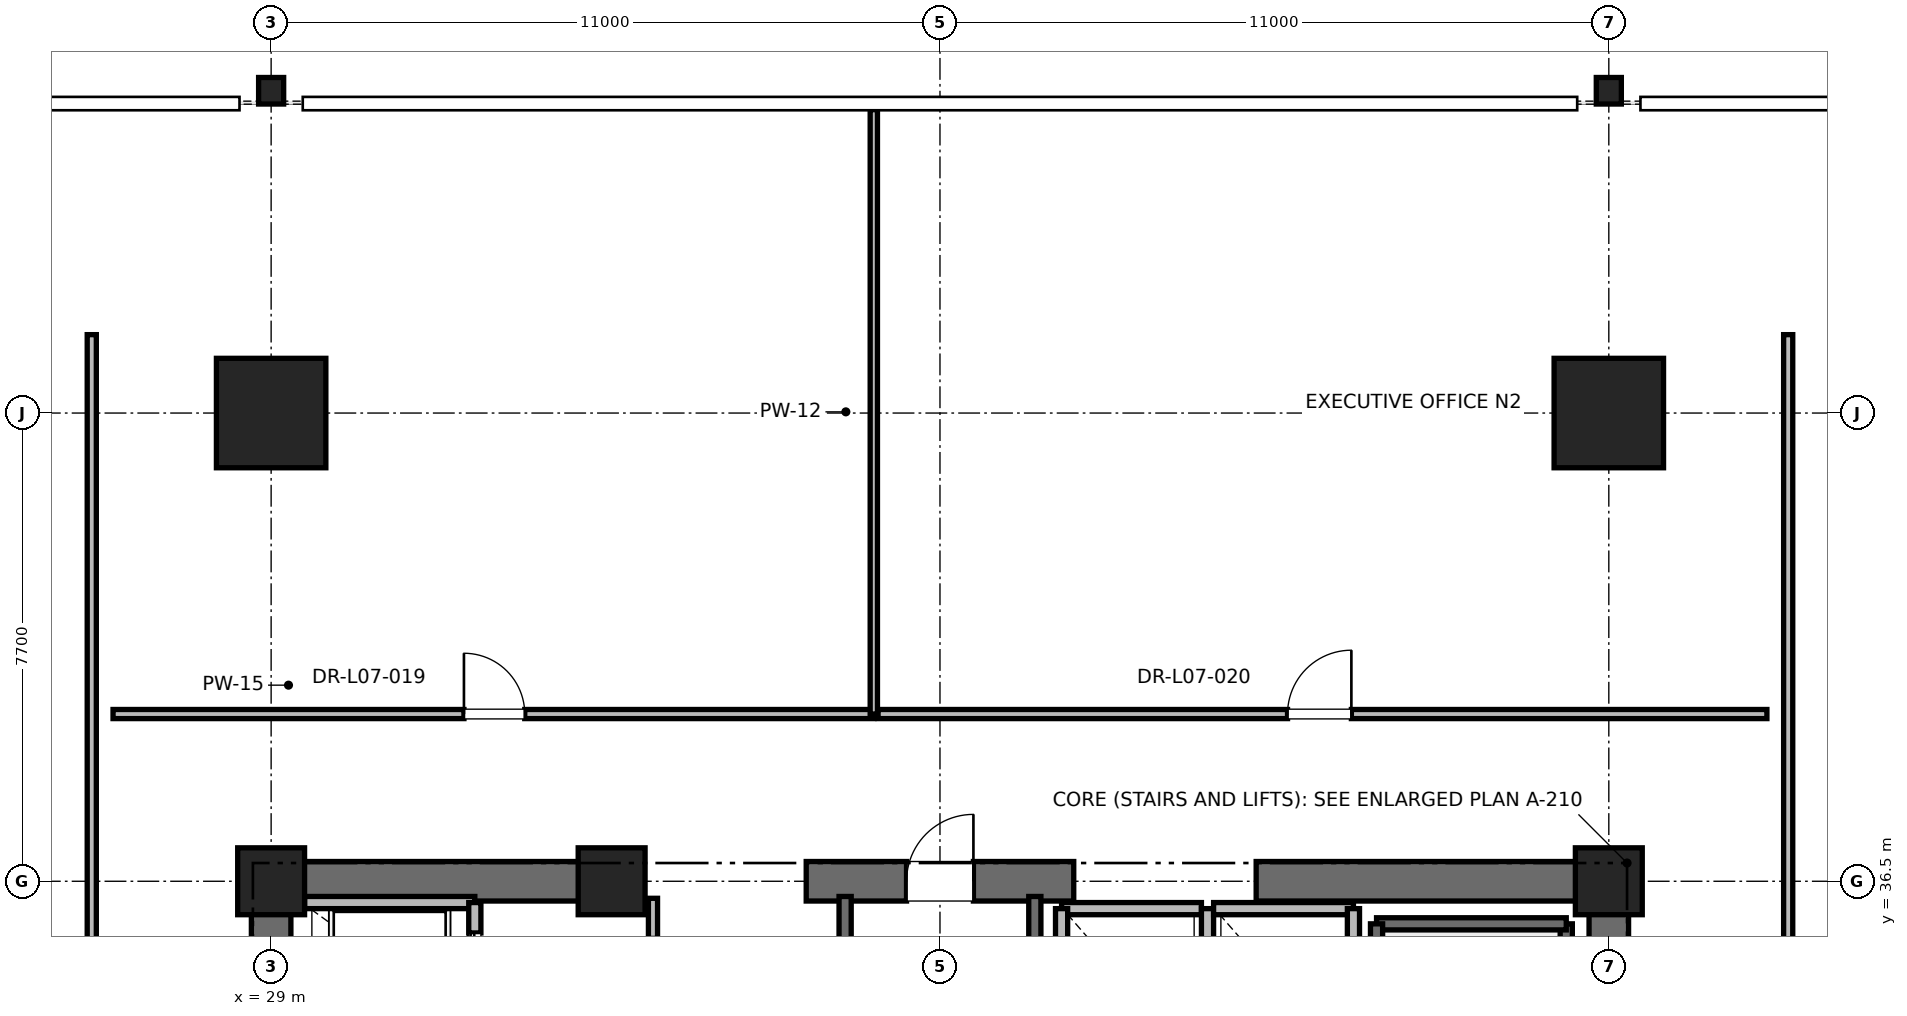
"""IFC4 building model, lengths in metres.
Left out: names, types, materials, properties, quantities, classifications, styles, units other than length and angle.
Written with IfcOpenShell. Run it as: python <this file> out.ifc"""

import sys

from ifc_helpers import new_model, si_unit, direction, frame, frame_2d, origin, origin_2d, place, context, subcontext, project, spatial, rectangle, i_section, extrude, element, fill, save


model = new_model("IFC4")
c1 = context("Model", 3, precision=1e-05, world=origin(), true_north=direction((0.0, 1.0)))
c2 = subcontext(c1, "Body", "Model", "MODEL_VIEW")
j1 = project(units=[si_unit("LENGTHUNIT", "METRE"), si_unit("PLANEANGLEUNIT", "RADIAN")], contexts=[c1])
p1 = place(None, origin())
s1 = spatial("IfcSite", under=j1, at=p1, CompositionType="ELEMENT")
p2 = place(p1, origin())
s2 = spatial("IfcBuilding", under=s1, at=p2, CompositionType="ELEMENT")
p3 = place(p2, frame((0.0, 0.0, 35.6)))
s3 = spatial("IfcBuildingStorey", under=s2, at=p3, CompositionType="ELEMENT", Elevation=35.6)
for number, where, z_axis, x_axis in (
    (1, (29.0, 44.2, 0.0), (0.0, 0.0, 1.0), (1.0, 0.0, 0.0)),
    (2, (51.0, 44.2, 0.0), (0.0, 0.0, 1.0), (1.0, 0.0, 0.0)),
):
    element("IfcColumn", number, at=place(p3, frame(where, z_axis=z_axis, x_axis=x_axis)), inside=s3, PredefinedType="COLUMN", context=c2, shape_type="SweptSolid", body=[
        extrude(rectangle(XDim=1.8, YDim=1.8, at=origin_2d()), origin(), (0.0, 0.0, 1.0), 4.0),
    ])
for number, where, z_axis, x_axis in (
    (3, (29.0, 49.5, 0.0), (0.0, 0.0, 1.0), (1.0, 0.0, 0.0)),
    (4, (51.0, 49.5, 0.0), (0.0, 0.0, 1.0), (1.0, 0.0, 0.0)),
):
    element("IfcColumn", number, at=place(p3, frame(where, z_axis=z_axis, x_axis=x_axis)), inside=s3, PredefinedType="COLUMN", context=c2, shape_type="SweptSolid", body=[
        extrude(i_section(OverallWidth=0.412, OverallDepth=0.437, WebThickness=0.036, FlangeThickness=0.058, FilletRadius=0.015, at=origin_2d()), origin(), (0.0, 0.0, 1.0), 4.0),
    ])
for number, where, z_axis, x_axis in (
    (5, (29.0, 36.5, 0.0), (0.0, 0.0, 1.0), (1.0, 0.0, 0.0)),
    (6, (51.0, 36.5, 0.0), (0.0, 0.0, 1.0), (1.0, 0.0, 0.0)),
    (7, (34.6, 36.5, 0.0), (0.0, 0.0, 1.0), (1.0, 0.0, 0.0)),
):
    element("IfcColumn", number, at=place(p3, frame(where, z_axis=z_axis, x_axis=x_axis)), inside=s3, PredefinedType="PILASTER", context=c2, shape_type="SweptSolid", body=[
        extrude(rectangle(XDim=1.1, YDim=1.1, at=origin_2d()), origin(), (0.0, 0.0, 1.0), 4.0),
    ])
p4 = place(p3, frame((29.0, 36.5, 0.0), z_axis=(0.0, 0.0, 1.0), x_axis=(1.0, 0.0, 0.0)))
e8 = element("IfcWall", 8, at=p4, inside=s3, PredefinedType="SHEAR", context=c2, shape_type="SweptSolid", body=[
    extrude(rectangle(XDim=5.8, YDim=0.65, at=frame_2d((2.9, 0.0))), origin(), (0.0, 0.0, 1.0), 3.76),
])
p5 = place(p3, frame((37.8, 36.5, 0.0), z_axis=(0.0, 0.0, 1.0), x_axis=(1.0, 0.0, 0.0)))
e9 = element("IfcWall", 9, at=p5, inside=s3, PredefinedType="SHEAR", context=c2, shape_type="SweptSolid", body=[
    extrude(rectangle(XDim=4.4, YDim=0.65, at=frame_2d((2.2, 0.0))), origin(), (0.0, 0.0, 1.0), 3.76),
])
p6 = place(p5, frame((1.65, 0.0, 0.0)))
e10 = element("IfcOpeningElement", 10, at=p6, cuts=e9, PredefinedType="OPENING", context=c2, shape_type="SweptSolid", body=[
    extrude(rectangle(XDim=1.1, YDim=2.15, at=frame_2d((0.55, 1.075))), frame((0.0, 0.325, 0.0), z_axis=(0.0, -1.0, 0.0), x_axis=(1.0, 0.0, 0.0)), (0.0, 0.0, 1.0), 0.65),
])
for number, where, z_axis, x_axis in (
    (11, (45.2, 36.5, 0.0), (0.0, 0.0, 1.0), (1.0, 0.0, 0.0)),
    (12, (29.0, 30.7, 0.0), (0.0, 0.0, 1.0), (0.0, 1.0, 0.0)),
):
    element("IfcWall", number, at=place(p3, frame(where, z_axis=z_axis, x_axis=x_axis)), inside=s3, PredefinedType="SHEAR", context=c2, shape_type="SweptSolid", body=[
        extrude(rectangle(XDim=5.8, YDim=0.65, at=frame_2d((2.9, 0.0))), origin(), (0.0, 0.0, 1.0), 3.76),
    ])
p7 = place(p3, frame((51.0, 27.7, 0.0), z_axis=(0.0, 0.0, 1.0), x_axis=(0.0, 1.0, 0.0)))
e13 = element("IfcWall", 13, at=p7, inside=s3, PredefinedType="SHEAR", context=c2, shape_type="SweptSolid", body=[
    extrude(rectangle(XDim=8.8, YDim=0.65, at=frame_2d((4.4, 0.0))), origin(), (0.0, 0.0, 1.0), 3.76),
])
p8 = place(p3, frame((50.3, 27.65, 0.0), z_axis=(0.0, 0.0, 1.0), x_axis=(0.0, 1.0, 0.0)))
e14 = element("IfcWall", 14, at=p8, inside=s3, PredefinedType="SOLIDWALL", context=c2, shape_type="SweptSolid", body=[
    extrude(rectangle(XDim=8.15, YDim=0.2, at=frame_2d((4.075, 0.0))), origin(), (0.0, 0.0, 1.0), 3.76),
])
p9 = place(p3, frame((47.18, 35.8, 0.0), z_axis=(0.0, 0.0, 1.0), x_axis=(1.0, 0.0, 0.0)))
e15 = element("IfcWall", 15, at=p9, inside=s3, PredefinedType="SOLIDWALL", context=c2, shape_type="SweptSolid", body=[
    extrude(rectangle(XDim=3.12, YDim=0.2, at=frame_2d((1.56, 0.0))), origin(), (0.0, 0.0, 1.0), 3.76),
])
p10 = place(p3, frame((47.18, 27.62, 0.0), z_axis=(0.0, 0.0, 1.0), x_axis=(0.0, 1.0, 0.0)))
e16 = element("IfcWall", 16, at=p10, inside=s3, PredefinedType="SOLIDWALL", context=c2, shape_type="SweptSolid", body=[
    extrude(rectangle(XDim=8.18, YDim=0.2, at=frame_2d((4.09, 0.0))), origin(), (0.0, 0.0, 1.0), 3.76),
])
p11 = place(p3, frame((38.44, 27.38, 0.0), z_axis=(0.0, 0.0, 1.0), x_axis=(0.0, 1.0, 0.0)))
e17 = element("IfcWall", 17, at=p11, inside=s3, PredefinedType="SOLIDWALL", context=c2, shape_type="SweptSolid", body=[
    extrude(rectangle(XDim=8.87, YDim=0.2, at=frame_2d((4.435, 0.0))), origin(), (0.0, 0.0, 1.0), 3.76),
])
p12 = place(p3, frame((41.56, 27.68, 0.0), z_axis=(0.0, 0.0, 1.0), x_axis=(0.0, 1.0, 0.0)))
e18 = element("IfcWall", 18, at=p12, inside=s3, PredefinedType="SOLIDWALL", context=c2, shape_type="SweptSolid", body=[
    extrude(rectangle(XDim=8.57, YDim=0.2, at=frame_2d((4.285, 0.0))), origin(), (0.0, 0.0, 1.0), 3.76),
])
p13 = place(p3, frame((32.35, 36.15, 0.0), z_axis=(0.0, 0.0, 1.0), x_axis=(-1.0, 0.0, 0.0)))
e19 = element("IfcWall", 19, at=p13, inside=s3, PredefinedType="SOLIDWALL", context=c2, shape_type="SweptSolid", body=[
    extrude(rectangle(XDim=2.8, YDim=0.2, at=frame_2d((1.4, 0.0))), origin(), (0.0, 0.0, 1.0), 2.889),
])
p14 = place(p3, frame((32.35, 34.05, 0.0), z_axis=(0.0, 0.0, 1.0), x_axis=(0.0, 1.0, 0.0)))
e20 = element("IfcWall", 20, at=p14, inside=s3, PredefinedType="SOLIDWALL", context=c2, shape_type="SweptSolid", body=[
    extrude(rectangle(XDim=2.1, YDim=0.2, at=frame_2d((1.05, 0.0))), origin(), (0.0, 0.0, 1.0), 3.76),
])
p15 = place(p14, frame((0.5, 0.0, 0.0)))
e21 = element("IfcOpeningElement", 21, at=p15, cuts=e20, PredefinedType="OPENING", context=c2, shape_type="SweptSolid", body=[
    extrude(rectangle(XDim=1.1, YDim=2.2, at=frame_2d((0.55, 1.1))), frame((0.0, 0.1, 0.0), z_axis=(0.0, -1.0, 0.0), x_axis=(1.0, 0.0, 0.0)), (0.0, 0.0, 1.0), 0.2),
])
p16 = place(p3, frame((44.3, 36.05, 0.0), z_axis=(0.0, 0.0, 1.0), x_axis=(-1.0, 0.0, 0.0)))
e22 = element("IfcWall", 22, at=p16, inside=s3, PredefinedType="SOLIDWALL", context=c2, shape_type="SweptSolid", body=[
    extrude(rectangle(XDim=2.3, YDim=0.2, at=frame_2d((1.15, 0.0))), origin(), (0.0, 0.0, 1.0), 2.54),
])
for number, where, z_axis, x_axis in (
    (23, (42.0, 36.05, 0.0), (0.0, 0.0, 1.0), (0.0, -1.0, 0.0)),
    (24, (44.4, 33.45, 0.0), (0.0, 0.0, 1.0), (0.0, 1.0, 0.0)),
):
    element("IfcWall", number, at=place(p3, frame(where, z_axis=z_axis, x_axis=x_axis)), inside=s3, PredefinedType="SOLIDWALL", context=c2, shape_type="SweptSolid", body=[
        extrude(rectangle(XDim=2.6, YDim=0.2, at=frame_2d((1.3, 0.0))), origin(), (0.0, 0.0, 1.0), 2.54),
    ])
p17 = place(p3, frame((46.8, 36.05, 0.0), z_axis=(0.0, 0.0, 1.0), x_axis=(-1.0, 0.0, 0.0)))
e25 = element("IfcWall", 25, at=p17, inside=s3, PredefinedType="SOLIDWALL", context=c2, shape_type="SweptSolid", body=[
    extrude(rectangle(XDim=2.3, YDim=0.2, at=frame_2d((1.15, 0.0))), origin(), (0.0, 0.0, 1.0), 2.54),
])
p18 = place(p3, frame((46.8, 33.45, 0.0), z_axis=(0.0, 0.0, 1.0), x_axis=(0.0, 1.0, 0.0)))
e26 = element("IfcWall", 26, at=p18, inside=s3, PredefinedType="SOLIDWALL", context=c2, shape_type="SweptSolid", body=[
    extrude(rectangle(XDim=2.6, YDim=0.2, at=frame_2d((1.3, 0.0))), origin(), (0.0, 0.0, 1.0), 3.76),
])
p19 = place(p3, frame((35.28, 33.95, 0.0), z_axis=(0.0, 0.0, 1.0), x_axis=(0.0, 1.0, 0.0)))
e27 = element("IfcWall", 27, at=p19, inside=s3, PredefinedType="PARTITIONING", context=c2, shape_type="SweptSolid", body=[
    extrude(rectangle(XDim=2.27, YDim=0.15, at=frame_2d((1.135, 0.0))), origin(), (0.0, 0.0, 1.0), 2.54),
])
p20 = place(p19, frame((0.66, 0.0, 0.0)))
e28 = element("IfcOpeningElement", 28, at=p20, cuts=e27, PredefinedType="OPENING", context=c2, shape_type="SweptSolid", body=[
    extrude(rectangle(XDim=0.95, YDim=2.15, at=frame_2d((0.475, 1.075))), frame((0.0, 0.075, 0.0), z_axis=(0.0, -1.0, 0.0), x_axis=(1.0, 0.0, 0.0)), (0.0, 0.0, 1.0), 0.15),
])
p21 = place(p3, frame((26.4, 39.25, 0.0), z_axis=(0.0, 0.0, 1.0), x_axis=(1.0, 0.0, 0.0)))
e29 = element("IfcWall", 29, at=p21, inside=s3, PredefinedType="PARTITIONING", context=c2, shape_type="SweptSolid", body=[
    extrude(rectangle(XDim=12.512, YDim=0.15, at=frame_2d((6.256, 0.0))), origin(), (0.0, 0.0, 1.0), 2.85),
])
p22 = place(p21, frame((5.771, 0.0, 0.0)))
e30 = element("IfcOpeningElement", 30, at=p22, cuts=e29, PredefinedType="OPENING", context=c2, shape_type="SweptSolid", body=[
    extrude(rectangle(XDim=1.0, YDim=2.15, at=frame_2d((0.5, 1.075))), frame((0.0, 0.075, 0.0), z_axis=(0.0, -1.0, 0.0), x_axis=(1.0, 0.0, 0.0)), (0.0, 0.0, 1.0), 0.15),
])
p23 = place(p3, frame((38.912, 39.25, 0.0), z_axis=(0.0, 0.0, 1.0), x_axis=(0.0, 1.0, 0.0)))
e31 = element("IfcWall", 31, at=p23, inside=s3, PredefinedType="PARTITIONING", context=c2, shape_type="SweptSolid", body=[
    extrude(rectangle(XDim=9.939, YDim=0.12, at=frame_2d((4.97, 0.0))), origin(), (0.0, 0.0, 1.0), 2.39),
])
p24 = place(p3, frame((38.982, 39.25, 0.0), z_axis=(0.0, 0.0, 1.0), x_axis=(1.0, 0.0, 0.0)))
e32 = element("IfcWall", 32, at=p24, inside=s3, PredefinedType="PARTITIONING", context=c2, shape_type="SweptSolid", body=[
    extrude(rectangle(XDim=14.618, YDim=0.15, at=frame_2d((7.309, 0.0))), origin(), (0.0, 0.0, 1.0), 2.85),
])
p25 = place(p24, frame((6.734, 0.0, 0.0)))
e33 = element("IfcOpeningElement", 33, at=p25, cuts=e32, PredefinedType="OPENING", context=c2, shape_type="SweptSolid", body=[
    extrude(rectangle(XDim=1.05, YDim=2.2, at=frame_2d((0.525, 1.1))), frame((0.0, 0.075, 0.0), z_axis=(0.0, -1.0, 0.0), x_axis=(1.0, 0.0, 0.0)), (0.0, 0.0, 1.0), 0.15),
])
p26 = place(p3, frame((26.05, 9.511, 0.0), z_axis=(0.0, 0.0, 1.0), x_axis=(0.0, 1.0, 0.0)))
e34 = element("IfcWall", 34, at=p26, inside=s3, PredefinedType="PARTITIONING", context=c2, shape_type="SweptSolid", body=[
    extrude(rectangle(XDim=35.979, YDim=0.15, at=frame_2d((17.989, 0.0))), origin(), (0.0, 0.0, 1.0), 2.85),
])
p27 = place(p26, frame((17.489, 0.0, 0.0)))
e35 = element("IfcOpeningElement", 35, at=p27, cuts=e34, PredefinedType="OPENING", context=c2, shape_type="SweptSolid", body=[
    extrude(rectangle(XDim=1.0, YDim=2.15, at=frame_2d((0.5, 1.075))), frame((0.0, 0.075, 0.0), z_axis=(0.0, -1.0, 0.0), x_axis=(1.0, 0.0, 0.0)), (0.0, 0.0, 1.0), 0.15),
])
p28 = place(p3, frame((53.95, 24.692, 0.0), z_axis=(0.0, 0.0, 1.0), x_axis=(0.0, 1.0, 0.0)))
e36 = element("IfcWall", 36, at=p28, inside=s3, PredefinedType="PARTITIONING", context=c2, shape_type="SweptSolid", body=[
    extrude(rectangle(XDim=20.798, YDim=0.15, at=frame_2d((10.399, 0.0))), origin(), (0.0, 0.0, 1.0), 2.85),
])
p29 = place(p28, frame((5.354, 0.0, 0.0)))
e37 = element("IfcOpeningElement", 37, at=p29, cuts=e36, PredefinedType="OPENING", context=c2, shape_type="SweptSolid", body=[
    extrude(rectangle(XDim=1.0, YDim=2.15, at=frame_2d((0.5, 1.075))), frame((0.0, 0.075, 0.0), z_axis=(0.0, -1.0, 0.0), x_axis=(1.0, 0.0, 0.0)), (0.0, 0.0, 1.0), 0.15),
])
p30 = place(p6, origin())
e38 = element("IfcDoor", 38, at=p30, inside=s3, OperationType="SINGLE_SWING_RIGHT", PredefinedType="DOOR", context=c2, shape_type="SweptSolid", body=[
    extrude(rectangle(XDim=1.1, YDim=2.15, at=frame_2d((0.55, 1.075))), frame((0.0, 0.025, 0.0), z_axis=(0.0, -1.0, 0.0), x_axis=(1.0, 0.0, 0.0)), (0.0, 0.0, 1.0), 0.05),
])
fill(e10, e38)
p31 = place(p15, origin())
e39 = element("IfcDoor", 39, at=p31, inside=s3, OperationType="SLIDING_TO_RIGHT", PredefinedType="DOOR", context=c2, shape_type="SweptSolid", body=[
    extrude(rectangle(XDim=1.1, YDim=2.2, at=frame_2d((0.55, 1.1))), frame((0.0, 0.025, 0.0), z_axis=(0.0, -1.0, 0.0), x_axis=(1.0, 0.0, 0.0)), (0.0, 0.0, 1.0), 0.05),
])
fill(e21, e39)
p32 = place(p22, origin())
e40 = element("IfcDoor", 40, at=p32, inside=s3, OperationType="SINGLE_SWING_LEFT", PredefinedType="DOOR", context=c2, shape_type="SweptSolid", body=[
    extrude(rectangle(XDim=1.0, YDim=2.15, at=frame_2d((0.5, 1.075))), frame((0.0, 0.025, 0.0), z_axis=(0.0, -1.0, 0.0), x_axis=(1.0, 0.0, 0.0)), (0.0, 0.0, 1.0), 0.05),
])
fill(e30, e40)
p33 = place(p25, origin())
e41 = element("IfcDoor", 41, at=p33, inside=s3, OperationType="SINGLE_SWING_RIGHT", PredefinedType="DOOR", context=c2, shape_type="SweptSolid", body=[
    extrude(rectangle(XDim=1.05, YDim=2.2, at=frame_2d((0.525, 1.1))), frame((0.0, 0.025, 0.0), z_axis=(0.0, -1.0, 0.0), x_axis=(1.0, 0.0, 0.0)), (0.0, 0.0, 1.0), 0.05),
])
fill(e33, e41)
save(model, sys.argv[1])
